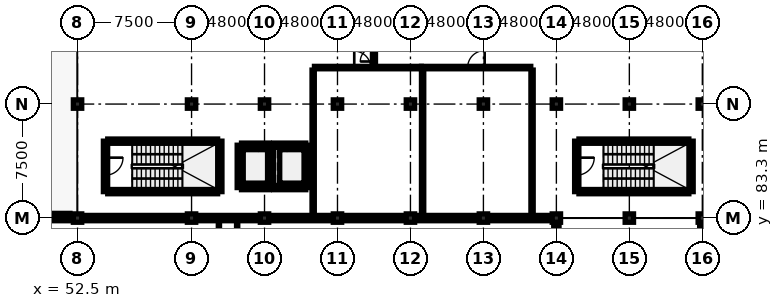
"""IFC4 building model, lengths in metres.
Left out: names, types, materials, properties, quantities, classifications, styles, units other than length and angle.
Written with IfcOpenShell. Run it as: python <this file> out.ifc"""

import sys

from ifc_helpers import new_model, si_unit, direction, frame, frame_2d, origin, origin_2d, place, context, subcontext, project, spatial, rectangle, extrude, element, fill, save


model = new_model("IFC4")
c1 = context("Model", 3, precision=1e-05, world=origin(), true_north=direction((0.0, 1.0)))
c2 = subcontext(c1, "Body", "Model", "MODEL_VIEW")
j1 = project(units=[si_unit("LENGTHUNIT", "METRE"), si_unit("PLANEANGLEUNIT", "RADIAN")], contexts=[c1])
p1 = place(None, origin())
s1 = spatial("IfcSite", under=j1, at=p1, CompositionType="ELEMENT")
p2 = place(p1, origin())
s2 = spatial("IfcBuilding", under=s1, at=p2, CompositionType="ELEMENT")
p3 = place(p2, frame((0.0, 0.0, 9.5)))
s3 = spatial("IfcBuildingStorey", under=s2, at=p3, CompositionType="ELEMENT", Elevation=9.5)
for number, where, z_axis, x_axis in (
    (1, (52.5, 83.3, 0.0), (0.0, 0.0, 1.0), (1.0, 0.0, 0.0)),
    (2, (52.5, 90.8, 0.0), (0.0, 0.0, 1.0), (1.0, 0.0, 0.0)),
    (3, (60.0, 83.3, 0.0), (0.0, 0.0, 1.0), (1.0, 0.0, 0.0)),
    (4, (60.0, 90.8, 0.0), (0.0, 0.0, 1.0), (1.0, 0.0, 0.0)),
    (5, (64.8, 83.3, 0.0), (0.0, 0.0, 1.0), (1.0, 0.0, 0.0)),
    (6, (64.8, 90.8, 0.0), (0.0, 0.0, 1.0), (1.0, 0.0, 0.0)),
    (7, (69.6, 83.3, 0.0), (0.0, 0.0, 1.0), (1.0, 0.0, 0.0)),
    (8, (69.6, 90.8, 0.0), (0.0, 0.0, 1.0), (1.0, 0.0, 0.0)),
    (9, (74.4, 83.3, 0.0), (0.0, 0.0, 1.0), (1.0, 0.0, 0.0)),
    (10, (74.4, 90.8, 0.0), (0.0, 0.0, 1.0), (1.0, 0.0, 0.0)),
    (11, (79.2, 83.3, 0.0), (0.0, 0.0, 1.0), (1.0, 0.0, 0.0)),
    (12, (79.2, 90.8, 0.0), (0.0, 0.0, 1.0), (1.0, 0.0, 0.0)),
):
    element("IfcColumn", number, at=place(p3, frame(where, z_axis=z_axis, x_axis=x_axis)), inside=s3, PredefinedType="COLUMN", context=c2, shape_type="SweptSolid", body=[
        extrude(rectangle(XDim=0.55, YDim=0.55, at=origin_2d()), origin(), (0.0, 0.0, 1.0), 3.7),
    ])
p4 = place(p3, frame((84.0, 83.3, 0.0), z_axis=(0.0, 0.0, 1.0), x_axis=(1.0, 0.0, 0.0)))
e13 = element("IfcColumn", 13, at=p4, inside=s3, PredefinedType="COLUMN", context=c2, shape_type="SweptSolid", body=[
    extrude(rectangle(XDim=0.55, YDim=0.55, at=origin_2d()), origin(), (0.0, 0.0, 1.0), 3.8),
])
for number, where, z_axis, x_axis in (
    (14, (84.0, 90.8, 0.0), (0.0, 0.0, 1.0), (1.0, 0.0, 0.0)),
    (15, (88.8, 83.3, 0.0), (0.0, 0.0, 1.0), (1.0, 0.0, 0.0)),
    (16, (88.8, 90.8, 0.0), (0.0, 0.0, 1.0), (1.0, 0.0, 0.0)),
):
    element("IfcColumn", number, at=place(p3, frame(where, z_axis=z_axis, x_axis=x_axis)), inside=s3, PredefinedType="COLUMN", context=c2, shape_type="SweptSolid", body=[
        extrude(rectangle(XDim=0.55, YDim=0.55, at=origin_2d()), origin(), (0.0, 0.0, 1.0), 3.7),
    ])
p5 = place(p3, frame((93.6, 83.3, 0.0), z_axis=(0.0, 0.0, 1.0), x_axis=(1.0, 0.0, 0.0)))
e17 = element("IfcColumn", 17, at=p5, inside=s3, PredefinedType="COLUMN", context=c2, shape_type="SweptSolid", body=[
    extrude(rectangle(XDim=0.55, YDim=0.55, at=origin_2d()), origin(), (0.0, 0.0, 1.0), 3.8),
])
p6 = place(p3, frame((93.6, 90.8, 0.0), z_axis=(0.0, 0.0, 1.0), x_axis=(1.0, 0.0, 0.0)))
e18 = element("IfcColumn", 18, at=p6, inside=s3, PredefinedType="COLUMN", context=c2, shape_type="SweptSolid", body=[
    extrude(rectangle(XDim=0.55, YDim=0.55, at=origin_2d()), origin(), (0.0, 0.0, 1.0), 3.7),
])
for number, where, z_axis, x_axis in (
    (19, (83.725, 83.3, 0.0), (0.0, 0.0, 1.0), (-1.0, 0.0, 0.0)),
    (20, (78.925, 83.3, 0.0), (0.0, 0.0, 1.0), (-1.0, 0.0, 0.0)),
    (21, (74.125, 83.3, 0.0), (0.0, 0.0, 1.0), (-1.0, 0.0, 0.0)),
    (22, (69.325, 83.3, 0.0), (0.0, 0.0, 1.0), (-1.0, 0.0, 0.0)),
):
    element("IfcWall", number, at=place(p3, frame(where, z_axis=z_axis, x_axis=x_axis)), inside=s3, PredefinedType="SOLIDWALL", context=c2, shape_type="SweptSolid", body=[
        extrude(rectangle(XDim=4.25, YDim=0.35, at=frame_2d((2.125, 0.0))), origin(), (0.0, 0.0, 1.0), 2.985),
    ])
p7 = place(p3, frame((64.525, 83.3, 0.0), z_axis=(0.0, 0.0, 1.0), x_axis=(-1.0, 0.0, 0.0)))
e23 = element("IfcWall", 23, at=p7, inside=s3, PredefinedType="SOLIDWALL", context=c2, shape_type="SweptSolid", body=[
    extrude(rectangle(XDim=4.25, YDim=0.35, at=frame_2d((2.125, 0.0))), origin(), (0.0, 0.0, 1.0), 3.035),
])
p8 = place(p3, frame((59.725, 83.3, 0.0), z_axis=(0.0, 0.0, 1.0), x_axis=(-1.0, 0.0, 0.0)))
e24 = element("IfcWall", 24, at=p8, inside=s3, PredefinedType="SOLIDWALL", context=c2, shape_type="SweptSolid", body=[
    extrude(rectangle(XDim=6.95, YDim=0.35, at=frame_2d((3.475, 0.0))), origin(), (0.0, 0.0, 1.0), 3.035),
])
p9 = place(p3, frame((52.225, 83.3, 0.0), z_axis=(0.0, 0.0, 1.0), x_axis=(-1.0, 0.0, 0.0)))
e25 = element("IfcWall", 25, at=p9, inside=s3, PredefinedType="SOLIDWALL", context=c2, shape_type="SweptSolid", body=[
    extrude(rectangle(XDim=6.975, YDim=0.35, at=frame_2d((3.488, 0.0))), origin(), (0.0, 0.0, 1.0), 3.035),
])
for number, where, z_axis, x_axis in (
    (26, (93.6, 83.025, 0.0), (0.0, 0.0, 1.0), (0.0, -1.0, 0.0)),
    (27, (84.0, 76.125, 0.0), (0.0, 0.0, 1.0), (0.0, 1.0, 0.0)),
):
    element("IfcWall", number, at=place(p3, frame(where, z_axis=z_axis, x_axis=x_axis)), inside=s3, PredefinedType="SOLIDWALL", context=c2, shape_type="SweptSolid", body=[
        extrude(rectangle(XDim=6.9, YDim=0.35, at=frame_2d((3.45, 0.0))), origin(), (0.0, 0.0, 1.0), 3.035),
    ])
p10 = place(p3, frame((52.0, 83.48, 3.9), z_axis=(0.0, 0.0, 1.0), x_axis=(-1.0, 0.0, 0.0)))
e28 = element("IfcWall", 28, at=p10, inside=s3, PredefinedType="PARAPET", context=c2, shape_type="SweptSolid", body=[
    extrude(rectangle(XDim=6.52, YDim=0.26, at=frame_2d((3.26, 0.0))), origin(), (0.0, 0.0, 1.0), 0.6),
])
p11 = place(p3, frame((54.485, 85.04, 0.0), z_axis=(0.0, 0.0, 1.0), x_axis=(1.0, 0.0, 0.0)))
e29 = element("IfcWall", 29, at=p11, inside=s3, PredefinedType="SHEAR", context=c2, shape_type="SweptSolid", body=[
    extrude(rectangle(XDim=7.23, YDim=0.28, at=frame_2d((3.615, 0.0))), origin(), (0.0, 0.0, 1.0), 3.7),
])
p12 = place(p3, frame((61.86, 85.04, 0.0), z_axis=(0.0, 0.0, 1.0), x_axis=(0.0, 1.0, 0.0)))
e30 = element("IfcWall", 30, at=p12, inside=s3, PredefinedType="SHEAR", context=c2, shape_type="SweptSolid", body=[
    extrude(rectangle(XDim=3.32, YDim=0.28, at=frame_2d((1.66, 0.0))), origin(), (0.0, 0.0, 1.0), 3.7),
])
p13 = place(p3, frame((61.715, 88.36, 0.0), z_axis=(0.0, 0.0, 1.0), x_axis=(-1.0, 0.0, 0.0)))
e31 = element("IfcWall", 31, at=p13, inside=s3, PredefinedType="SHEAR", context=c2, shape_type="SweptSolid", body=[
    extrude(rectangle(XDim=7.23, YDim=0.28, at=frame_2d((3.615, 0.0))), origin(), (0.0, 0.0, 1.0), 3.7),
])
p14 = place(p3, frame((54.34, 88.36, 0.0), z_axis=(0.0, 0.0, 1.0), x_axis=(0.0, -1.0, 0.0)))
e32 = element("IfcWall", 32, at=p14, inside=s3, PredefinedType="SHEAR", context=c2, shape_type="SweptSolid", body=[
    extrude(rectangle(XDim=3.32, YDim=0.28, at=frame_2d((1.66, 0.0))), origin(), (0.0, 0.0, 1.0), 3.7),
])
p15 = place(p14, frame((1.085, 0.0, 0.0)))
e33 = element("IfcOpeningElement", 33, at=p15, cuts=e32, PredefinedType="OPENING", context=c2, shape_type="SweptSolid", body=[
    extrude(rectangle(XDim=1.15, YDim=2.15, at=frame_2d((0.575, 1.075))), frame((0.0, 0.152, 0.0), z_axis=(0.0, -1.0, 0.0), x_axis=(1.0, 0.0, 0.0)), (0.0, 0.0, 1.0), 0.304),
])
p16 = place(p3, frame((63.286, 85.307, 0.0), z_axis=(0.0, 0.0, 1.0), x_axis=(1.0, 0.0, 0.0)))
e34 = element("IfcWall", 34, at=p16, inside=s3, PredefinedType="SHEAR", context=c2, shape_type="SweptSolid", body=[
    extrude(rectangle(XDim=1.828, YDim=0.28, at=frame_2d((0.914, 0.0))), origin(), (0.0, 0.0, 1.0), 3.7),
])
p17 = place(p3, frame((65.259, 85.307, 0.0), z_axis=(0.0, 0.0, 1.0), x_axis=(0.0, 1.0, 0.0)))
e35 = element("IfcWall", 35, at=p17, inside=s3, PredefinedType="SHEAR", context=c2, shape_type="SweptSolid", body=[
    extrude(rectangle(XDim=2.787, YDim=0.28, at=frame_2d((1.393, 0.0))), origin(), (0.0, 0.0, 1.0), 3.7),
])
p18 = place(p3, frame((65.114, 88.093, 0.0), z_axis=(0.0, 0.0, 1.0), x_axis=(-1.0, 0.0, 0.0)))
e36 = element("IfcWall", 36, at=p18, inside=s3, PredefinedType="SHEAR", context=c2, shape_type="SweptSolid", body=[
    extrude(rectangle(XDim=1.828, YDim=0.28, at=frame_2d((0.914, 0.0))), origin(), (0.0, 0.0, 1.0), 3.7),
])
p19 = place(p18, frame((0.314, 0.0, 0.0)))
e37 = element("IfcOpeningElement", 37, at=p19, cuts=e36, PredefinedType="OPENING", context=c2, shape_type="SweptSolid", body=[
    extrude(rectangle(XDim=1.2, YDim=2.15, at=frame_2d((0.6, 1.075))), frame((0.0, 0.152, 0.0), z_axis=(0.0, -1.0, 0.0), x_axis=(1.0, 0.0, 0.0)), (0.0, 0.0, 1.0), 0.304),
])
p20 = place(p3, frame((63.141, 88.093, 0.0), z_axis=(0.0, 0.0, 1.0), x_axis=(0.0, -1.0, 0.0)))
e38 = element("IfcWall", 38, at=p20, inside=s3, PredefinedType="SHEAR", context=c2, shape_type="SweptSolid", body=[
    extrude(rectangle(XDim=2.787, YDim=0.28, at=frame_2d((1.393, 0.0))), origin(), (0.0, 0.0, 1.0), 3.7),
])
p21 = place(p3, frame((65.404, 85.307, 0.0), z_axis=(0.0, 0.0, 1.0), x_axis=(1.0, 0.0, 0.0)))
e39 = element("IfcWall", 39, at=p21, inside=s3, PredefinedType="SHEAR", context=c2, shape_type="SweptSolid", body=[
    extrude(rectangle(XDim=2.11, YDim=0.28, at=frame_2d((1.055, 0.0))), origin(), (0.0, 0.0, 1.0), 3.7),
])
p22 = place(p3, frame((67.659, 85.307, 0.0), z_axis=(0.0, 0.0, 1.0), x_axis=(0.0, 1.0, 0.0)))
e40 = element("IfcWall", 40, at=p22, inside=s3, PredefinedType="SHEAR", context=c2, shape_type="SweptSolid", body=[
    extrude(rectangle(XDim=2.787, YDim=0.28, at=frame_2d((1.393, 0.0))), origin(), (0.0, 0.0, 1.0), 3.7),
])
p23 = place(p3, frame((67.514, 88.093, 0.0), z_axis=(0.0, 0.0, 1.0), x_axis=(-1.0, 0.0, 0.0)))
e41 = element("IfcWall", 41, at=p23, inside=s3, PredefinedType="SHEAR", context=c2, shape_type="SweptSolid", body=[
    extrude(rectangle(XDim=2.11, YDim=0.28, at=frame_2d((1.055, 0.0))), origin(), (0.0, 0.0, 1.0), 3.7),
])
p24 = place(p23, frame((0.455, 0.0, 0.0)))
e42 = element("IfcOpeningElement", 42, at=p24, cuts=e41, PredefinedType="OPENING", context=c2, shape_type="SweptSolid", body=[
    extrude(rectangle(XDim=1.2, YDim=2.15, at=frame_2d((0.6, 1.075))), frame((0.0, 0.152, 0.0), z_axis=(0.0, -1.0, 0.0), x_axis=(1.0, 0.0, 0.0)), (0.0, 0.0, 1.0), 0.304),
])
p25 = place(p3, frame((85.485, 85.04, 0.0), z_axis=(0.0, 0.0, 1.0), x_axis=(1.0, 0.0, 0.0)))
e43 = element("IfcWall", 43, at=p25, inside=s3, PredefinedType="SHEAR", context=c2, shape_type="SweptSolid", body=[
    extrude(rectangle(XDim=7.23, YDim=0.28, at=frame_2d((3.615, 0.0))), origin(), (0.0, 0.0, 1.0), 3.7),
])
p26 = place(p3, frame((92.86, 85.04, 0.0), z_axis=(0.0, 0.0, 1.0), x_axis=(0.0, 1.0, 0.0)))
e44 = element("IfcWall", 44, at=p26, inside=s3, PredefinedType="SHEAR", context=c2, shape_type="SweptSolid", body=[
    extrude(rectangle(XDim=3.32, YDim=0.28, at=frame_2d((1.66, 0.0))), origin(), (0.0, 0.0, 1.0), 3.7),
])
p27 = place(p3, frame((92.715, 88.36, 0.0), z_axis=(0.0, 0.0, 1.0), x_axis=(-1.0, 0.0, 0.0)))
e45 = element("IfcWall", 45, at=p27, inside=s3, PredefinedType="SHEAR", context=c2, shape_type="SweptSolid", body=[
    extrude(rectangle(XDim=7.23, YDim=0.28, at=frame_2d((3.615, 0.0))), origin(), (0.0, 0.0, 1.0), 3.7),
])
p28 = place(p3, frame((85.34, 88.36, 0.0), z_axis=(0.0, 0.0, 1.0), x_axis=(0.0, -1.0, 0.0)))
e46 = element("IfcWall", 46, at=p28, inside=s3, PredefinedType="SHEAR", context=c2, shape_type="SweptSolid", body=[
    extrude(rectangle(XDim=3.32, YDim=0.28, at=frame_2d((1.66, 0.0))), origin(), (0.0, 0.0, 1.0), 3.7),
])
p29 = place(p28, frame((1.085, 0.0, 0.0)))
e47 = element("IfcOpeningElement", 47, at=p29, cuts=e46, PredefinedType="OPENING", context=c2, shape_type="SweptSolid", body=[
    extrude(rectangle(XDim=1.15, YDim=2.15, at=frame_2d((0.575, 1.075))), frame((0.0, 0.152, 0.0), z_axis=(0.0, -1.0, 0.0), x_axis=(1.0, 0.0, 0.0)), (0.0, 0.0, 1.0), 0.304),
])
p30 = place(p3, frame((72.0, 93.285, 0.0), z_axis=(0.0, 0.0, 1.0), x_axis=(0.0, 1.0, 0.0)))
e48 = element("IfcWall", 48, at=p30, inside=s3, PredefinedType="PARTITIONING", context=c2, shape_type="SweptSolid", body=[
    extrude(rectangle(XDim=2.43, YDim=0.2, at=frame_2d((1.215, 0.0))), origin(), (0.0, 0.0, 1.0), 3.7),
])
p31 = place(p30, frame((0.315, 0.0, 0.0)))
e49 = element("IfcOpeningElement", 49, at=p31, cuts=e48, PredefinedType="OPENING", context=c2, shape_type="SweptSolid", body=[
    extrude(rectangle(XDim=1.8, YDim=2.15, at=frame_2d((0.9, 1.075))), frame((0.0, 0.112, 0.0), z_axis=(0.0, -1.0, 0.0), x_axis=(1.0, 0.0, 0.0)), (0.0, 0.0, 1.0), 0.224),
])
p32 = place(p3, frame((68.085, 93.2, 0.0), z_axis=(0.0, 0.0, 1.0), x_axis=(1.0, 0.0, 0.0)))
e50 = element("IfcWall", 50, at=p32, inside=s3, PredefinedType="PARTITIONING", context=c2, shape_type="SweptSolid", body=[
    extrude(rectangle(XDim=7.03, YDim=0.16, at=frame_2d((3.515, 0.0))), origin(), (0.0, 0.0, 1.0), 2.985),
])
p33 = place(p32, frame((2.618, 0.0, 0.0)))
e51 = element("IfcOpeningElement", 51, at=p33, cuts=e50, PredefinedType="OPENING", context=c2, shape_type="SweptSolid", body=[
    extrude(rectangle(XDim=1.08, YDim=2.18, at=frame_2d((0.54, 1.09))), frame((0.0, 0.092, 0.0), z_axis=(0.0, -1.0, 0.0), x_axis=(1.0, 0.0, 0.0)), (0.0, 0.0, 1.0), 0.184),
])
p34 = place(p3, frame((75.127, 93.2, 0.0), z_axis=(0.0, 0.0, 1.0), x_axis=(1.0, 0.0, 0.0)))
e52 = element("IfcWall", 52, at=p34, inside=s3, PredefinedType="PARTITIONING", context=c2, shape_type="SweptSolid", body=[
    extrude(rectangle(XDim=7.188, YDim=0.16, at=frame_2d((3.594, 0.0))), origin(), (0.0, 0.0, 1.0), 2.985),
])
p35 = place(p34, frame((3.034, 0.0, 0.0)))
e53 = element("IfcOpeningElement", 53, at=p35, cuts=e52, PredefinedType="OPENING", context=c2, shape_type="SweptSolid", body=[
    extrude(rectangle(XDim=1.12, YDim=2.2, at=frame_2d((0.56, 1.1))), frame((0.0, 0.092, 0.0), z_axis=(0.0, -1.0, 0.0), x_axis=(1.0, 0.0, 0.0)), (0.0, 0.0, 1.0), 0.184),
])
p36 = place(p3, frame((68.0, 83.487, 0.0), z_axis=(0.0, 0.0, 1.0), x_axis=(0.0, 1.0, 0.0)))
e54 = element("IfcWall", 54, at=p36, inside=s3, PredefinedType="PARTITIONING", context=c2, shape_type="SweptSolid", body=[
    extrude(rectangle(XDim=9.548, YDim=0.15, at=frame_2d((4.774, 0.0))), origin(), (0.0, 0.0, 1.0), 3.035),
])
p37 = place(p3, frame((75.2, 83.487, 0.0), z_axis=(0.0, 0.0, 1.0), x_axis=(0.0, 1.0, 0.0)))
e55 = element("IfcWall", 55, at=p37, inside=s3, PredefinedType="PARTITIONING", context=c2, shape_type="SweptSolid", body=[
    extrude(rectangle(XDim=9.621, YDim=0.15, at=frame_2d((4.811, 0.0))), origin(), (0.0, 0.0, 1.0), 3.035),
])
p38 = place(p3, frame((82.4, 83.487, 0.0), z_axis=(0.0, 0.0, 1.0), x_axis=(0.0, 1.0, 0.0)))
e56 = element("IfcWall", 56, at=p38, inside=s3, PredefinedType="PARTITIONING", context=c2, shape_type="SweptSolid", body=[
    extrude(rectangle(XDim=9.548, YDim=0.15, at=frame_2d((4.774, 0.0))), origin(), (0.0, 0.0, 1.0), 3.035),
])
p39 = place(p15, origin())
e57 = element("IfcDoor", 57, at=p39, inside=s3, OperationType="SINGLE_SWING_LEFT", PredefinedType="DOOR", context=c2, shape_type="SweptSolid", body=[
    extrude(rectangle(XDim=1.15, YDim=2.15, at=frame_2d((0.575, 1.075))), frame((0.0, 0.025, 0.0), z_axis=(0.0, -1.0, 0.0), x_axis=(1.0, 0.0, 0.0)), (0.0, 0.0, 1.0), 0.05),
])
fill(e33, e57)
p40 = place(p19, origin())
e58 = element("IfcDoor", 58, at=p40, inside=s3, OperationType="SLIDING_TO_LEFT", PredefinedType="DOOR", context=c2, shape_type="SweptSolid", body=[
    extrude(rectangle(XDim=1.2, YDim=2.15, at=frame_2d((0.6, 1.075))), frame((0.0, 0.025, 0.0), z_axis=(0.0, -1.0, 0.0), x_axis=(1.0, 0.0, 0.0)), (0.0, 0.0, 1.0), 0.05),
])
fill(e37, e58)
p41 = place(p24, origin())
e59 = element("IfcDoor", 59, at=p41, inside=s3, OperationType="SLIDING_TO_RIGHT", PredefinedType="DOOR", context=c2, shape_type="SweptSolid", body=[
    extrude(rectangle(XDim=1.2, YDim=2.15, at=frame_2d((0.6, 1.075))), frame((0.0, 0.025, 0.0), z_axis=(0.0, -1.0, 0.0), x_axis=(1.0, 0.0, 0.0)), (0.0, 0.0, 1.0), 0.05),
])
fill(e42, e59)
p42 = place(p29, origin())
e60 = element("IfcDoor", 60, at=p42, inside=s3, OperationType="SINGLE_SWING_LEFT", PredefinedType="DOOR", context=c2, shape_type="SweptSolid", body=[
    extrude(rectangle(XDim=1.15, YDim=2.15, at=frame_2d((0.575, 1.075))), frame((0.0, 0.025, 0.0), z_axis=(0.0, -1.0, 0.0), x_axis=(1.0, 0.0, 0.0)), (0.0, 0.0, 1.0), 0.05),
])
fill(e47, e60)
p43 = place(p31, origin())
e61 = element("IfcDoor", 61, at=p43, inside=s3, OperationType="DOUBLE_DOOR_SINGLE_SWING", PredefinedType="DOOR", context=c2, shape_type="SweptSolid", body=[
    extrude(rectangle(XDim=1.8, YDim=2.15, at=frame_2d((0.9, 1.075))), frame((0.0, 0.025, 0.0), z_axis=(0.0, -1.0, 0.0), x_axis=(1.0, 0.0, 0.0)), (0.0, 0.0, 1.0), 0.05),
])
fill(e49, e61)
p44 = place(p33, origin())
e62 = element("IfcDoor", 62, at=p44, inside=s3, OperationType="SINGLE_SWING_LEFT", PredefinedType="DOOR", context=c2, shape_type="SweptSolid", body=[
    extrude(rectangle(XDim=1.08, YDim=2.18, at=frame_2d((0.54, 1.09))), frame((0.0, 0.025, 0.0), z_axis=(0.0, -1.0, 0.0), x_axis=(1.0, 0.0, 0.0)), (0.0, 0.0, 1.0), 0.05),
])
fill(e51, e62)
p45 = place(p35, origin())
e63 = element("IfcDoor", 63, at=p45, inside=s3, OperationType="SINGLE_SWING_RIGHT", PredefinedType="DOOR", context=c2, shape_type="SweptSolid", body=[
    extrude(rectangle(XDim=1.12, YDim=2.2, at=frame_2d((0.56, 1.1))), frame((0.0, 0.025, 0.0), z_axis=(0.0, -1.0, 0.0), x_axis=(1.0, 0.0, 0.0)), (0.0, 0.0, 1.0), 0.05),
])
fill(e53, e63)
save(model, sys.argv[1])
